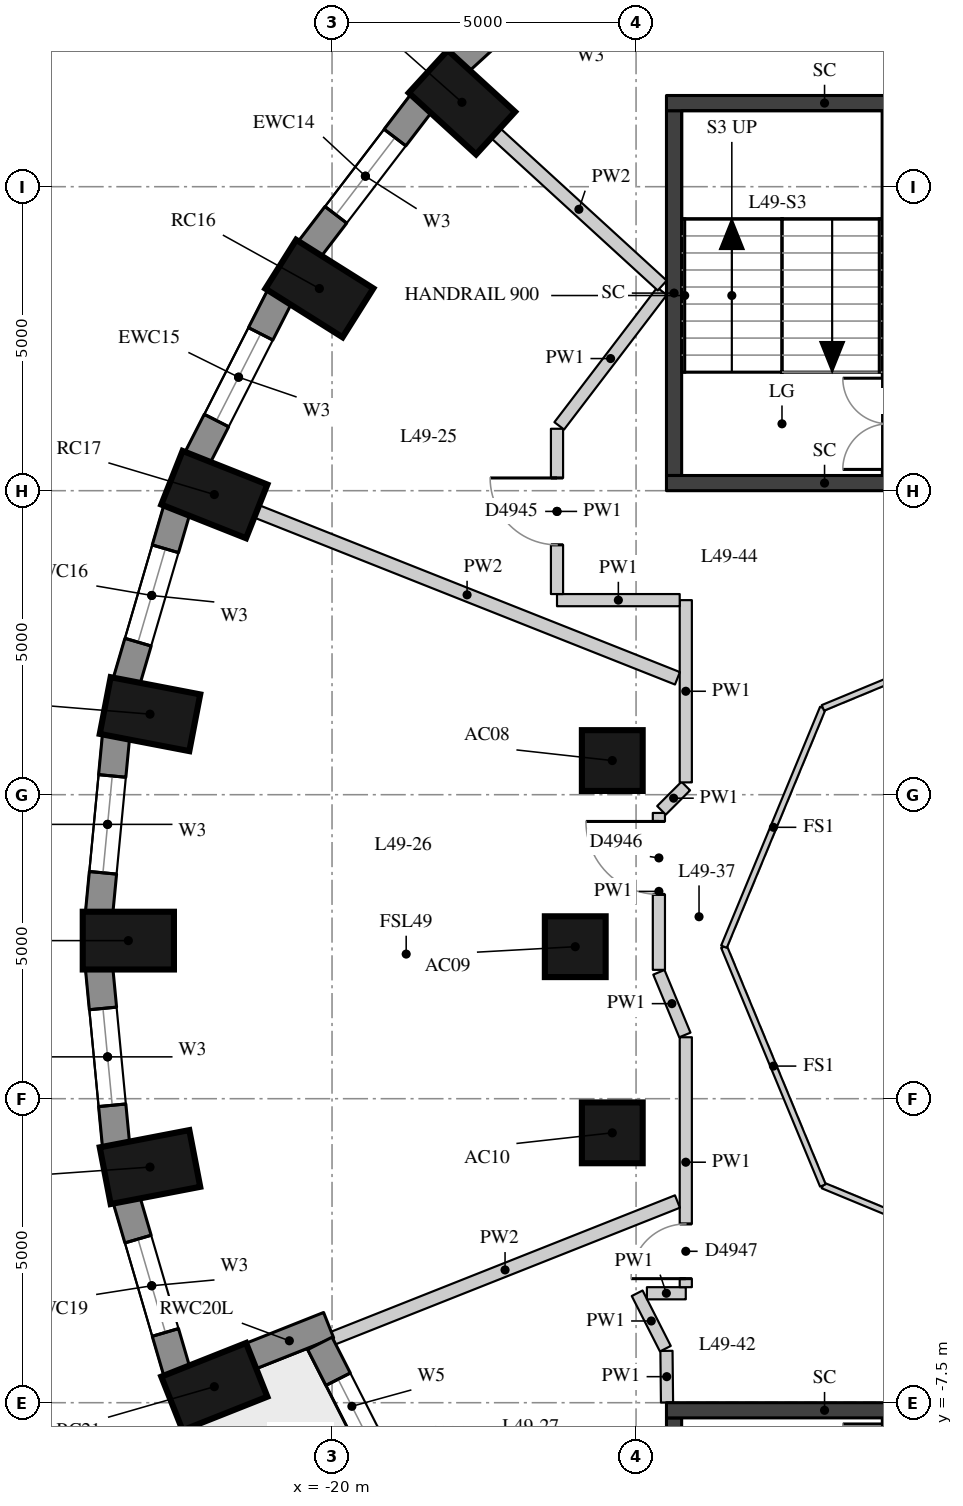
"""IFC4 building model, lengths in metres.
Left out: names, types, materials, properties, quantities, classifications, styles, units other than length and angle.
Written with IfcOpenShell. Run it as: python <this file> out.ifc"""

import sys

from ifc_helpers import new_model, si_unit, direction, frame, frame_2d, origin, origin_2d, place, context, subcontext, project, spatial, rectangle, extrude, element, fill, save


model = new_model("IFC4")
c1 = context("Model", 3, precision=1e-05, world=origin(), true_north=direction((0.0, 1.0)))
c2 = subcontext(c1, "Body", "Model", "MODEL_VIEW")
j1 = project(units=[si_unit("LENGTHUNIT", "METRE"), si_unit("PLANEANGLEUNIT", "RADIAN")], contexts=[c1])
p1 = place(None, origin())
s1 = spatial("IfcSite", under=j1, at=p1, CompositionType="ELEMENT")
p2 = place(p1, origin())
s2 = spatial("IfcBuilding", under=s1, at=p2, CompositionType="ELEMENT")
p3 = place(p2, frame((0.0, 0.0, 174.8)))
s3 = spatial("IfcBuildingStorey", under=s2, at=p3, CompositionType="ELEMENT", Elevation=174.8)
for number, where, z_axis, x_axis in (
    (1, (-17.864, 13.888, 0.0), (0.0, 0.0, 1.0), (-0.738, 0.675, 0.0)),
    (2, (-20.208, 10.825, 0.0), (0.0, 0.0, 1.0), (-0.846, 0.533, 0.0)),
    (3, (-21.936, 7.436, 0.0), (0.0, 0.0, 1.0), (-0.93, 0.369, 0.0)),
    (4, (-22.994, 3.825, 0.0), (0.0, 0.0, 1.0), (-0.982, 0.189, 0.0)),
    (5, (-23.35, 0.1, 0.0), (0.0, 0.0, 1.0), (-1.0, 0.0, 0.0)),
    (6, (-22.994, -3.625, 0.0), (0.0, 0.0, 1.0), (-0.982, -0.189, 0.0)),
    (7, (-21.936, -7.236, 0.0), (0.0, 0.0, 1.0), (-0.93, -0.369, 0.0)),
):
    element("IfcColumn", number, at=place(p3, frame(where, z_axis=z_axis, x_axis=x_axis)), inside=s3, PredefinedType="COLUMN", context=c2, shape_type="SweptSolid", body=[
        extrude(rectangle(XDim=1.5, YDim=0.95, at=origin_2d()), origin(), (0.0, 0.0, 1.0), 3.3),
    ])
for number, where, z_axis, x_axis in (
    (8, (-15.391, 3.062, 0.0), (0.0, 0.0, 1.0), (1.0, 0.0, 0.0)),
    (9, (-16.0, 0.0, 0.0), (0.0, 0.0, 1.0), (1.0, 0.0, 0.0)),
    (10, (-15.391, -3.062, 0.0), (0.0, 0.0, 1.0), (1.0, 0.0, 0.0)),
):
    element("IfcColumn", number, at=place(p3, frame(where, z_axis=z_axis, x_axis=x_axis)), inside=s3, PredefinedType="COLUMN", context=c2, shape_type="SweptSolid", body=[
        extrude(rectangle(XDim=1.0, YDim=1.0, at=origin_2d()), origin(), (0.0, 0.0, 1.0), 3.3),
    ])
p4 = place(p3, frame((-15.63, 16.639, 0.0), z_axis=(0.0, 0.0, 1.0), x_axis=(-0.737808755941, -0.675009807082, 0.0)))
e11 = element("IfcWall", 11, at=p4, inside=s3, PredefinedType="SOLIDWALL", context=c2, shape_type="SweptSolid", body=[
    extrude(rectangle(XDim=3.094, YDim=0.45, at=frame_2d((1.547, 0.0))), origin(), (0.0, 0.0, 1.0), 3.02),
])
p5 = place(p4, frame((0.747, 0.0, 0.4)))
e12 = element("IfcOpeningElement", 12, at=p5, cuts=e11, PredefinedType="OPENING", context=c2, shape_type="SweptSolid", body=[
    extrude(rectangle(XDim=1.6, YDim=1.75, at=frame_2d((0.8, 0.875))), frame((0.0, 0.235, 0.0), z_axis=(0.0, -1.0, 0.0), x_axis=(1.0, 0.0, 0.0)), (0.0, 0.0, 1.0), 0.47),
])
p6 = place(p3, frame((-18.528, 13.879, 0.0), z_axis=(0.0, 0.0, 1.0), x_axis=(-0.607817056371, -0.794077090706, 0.0)))
e13 = element("IfcWall", 13, at=p6, inside=s3, PredefinedType="SOLIDWALL", context=c2, shape_type="SweptSolid", body=[
    extrude(rectangle(XDim=3.037, YDim=0.45, at=frame_2d((1.519, 0.0))), origin(), (0.0, 0.0, 1.0), 3.02),
])
p7 = place(p6, frame((0.719, 0.0, 0.4)))
e14 = element("IfcOpeningElement", 14, at=p7, cuts=e13, PredefinedType="OPENING", context=c2, shape_type="SweptSolid", body=[
    extrude(rectangle(XDim=1.6, YDim=1.75, at=frame_2d((0.8, 0.875))), frame((0.0, 0.235, 0.0), z_axis=(0.0, -1.0, 0.0), x_axis=(1.0, 0.0, 0.0)), (0.0, 0.0, 1.0), 0.47),
])
p8 = place(p3, frame((-20.859, 10.697, 0.0), z_axis=(0.0, 0.0, 1.0), x_axis=(-0.454133999889, -0.890933392653, 0.0)))
e15 = element("IfcWall", 15, at=p8, inside=s3, PredefinedType="SOLIDWALL", context=c2, shape_type="SweptSolid", body=[
    extrude(rectangle(XDim=2.986, YDim=0.45, at=frame_2d((1.493, 0.0))), origin(), (0.0, 0.0, 1.0), 3.02),
])
p9 = place(p8, frame((0.693, 0.0, 0.4)))
e16 = element("IfcOpeningElement", 16, at=p9, cuts=e15, PredefinedType="OPENING", context=c2, shape_type="SweptSolid", body=[
    extrude(rectangle(XDim=1.6, YDim=1.75, at=frame_2d((0.8, 0.875))), frame((0.0, 0.235, 0.0), z_axis=(0.0, -1.0, 0.0), x_axis=(1.0, 0.0, 0.0)), (0.0, 0.0, 1.0), 0.47),
])
p10 = place(p3, frame((-22.551, 7.191, 0.0), z_axis=(0.0, 0.0, 1.0), x_axis=(-0.281125768296, -0.959670934435, 0.0)))
e17 = element("IfcWall", 17, at=p10, inside=s3, PredefinedType="SOLIDWALL", context=c2, shape_type="SweptSolid", body=[
    extrude(rectangle(XDim=2.948, YDim=0.45, at=frame_2d((1.474, 0.0))), origin(), (0.0, 0.0, 1.0), 3.02),
])
p11 = place(p10, frame((0.674, 0.0, 0.4)))
e18 = element("IfcOpeningElement", 18, at=p11, cuts=e17, PredefinedType="OPENING", context=c2, shape_type="SweptSolid", body=[
    extrude(rectangle(XDim=1.6, YDim=1.75, at=frame_2d((0.8, 0.875))), frame((0.0, 0.235, 0.0), z_axis=(0.0, -1.0, 0.0), x_axis=(1.0, 0.0, 0.0)), (0.0, 0.0, 1.0), 0.47),
])
p12 = place(p3, frame((-23.552, 3.469, 0.0), z_axis=(0.0, 0.0, 1.0), x_axis=(-0.095265737322, -0.995451876935, 0.0)))
e19 = element("IfcWall", 19, at=p12, inside=s3, PredefinedType="SOLIDWALL", context=c2, shape_type="SweptSolid", body=[
    extrude(rectangle(XDim=2.927, YDim=0.45, at=frame_2d((1.463, 0.0))), origin(), (0.0, 0.0, 1.0), 3.02),
])
p13 = place(p12, frame((0.663, 0.0, 0.4)))
e20 = element("IfcOpeningElement", 20, at=p13, cuts=e19, PredefinedType="OPENING", context=c2, shape_type="SweptSolid", body=[
    extrude(rectangle(XDim=1.6, YDim=1.75, at=frame_2d((0.8, 0.875))), frame((0.0, 0.235, 0.0), z_axis=(0.0, -1.0, 0.0), x_axis=(1.0, 0.0, 0.0)), (0.0, 0.0, 1.0), 0.47),
])
p14 = place(p3, frame((-23.831, -0.355, 0.0), z_axis=(0.0, 0.0, 1.0), x_axis=(0.095257827044, -0.995452633924, 0.0)))
e21 = element("IfcWall", 21, at=p14, inside=s3, PredefinedType="SOLIDWALL", context=c2, shape_type="SweptSolid", body=[
    extrude(rectangle(XDim=2.927, YDim=0.45, at=frame_2d((1.463, 0.0))), origin(), (0.0, 0.0, 1.0), 3.02),
])
p15 = place(p14, frame((0.663, 0.0, 0.4)))
e22 = element("IfcOpeningElement", 22, at=p15, cuts=e21, PredefinedType="OPENING", context=c2, shape_type="SweptSolid", body=[
    extrude(rectangle(XDim=1.6, YDim=1.75, at=frame_2d((0.8, 0.875))), frame((0.0, 0.235, 0.0), z_axis=(0.0, -1.0, 0.0), x_axis=(1.0, 0.0, 0.0)), (0.0, 0.0, 1.0), 0.47),
])
p16 = place(p3, frame((-23.38, -4.162, 0.0), z_axis=(0.0, 0.0, 1.0), x_axis=(0.281125768296, -0.959670934435, 0.0)))
e23 = element("IfcWall", 23, at=p16, inside=s3, PredefinedType="SOLIDWALL", context=c2, shape_type="SweptSolid", body=[
    extrude(rectangle(XDim=2.948, YDim=0.45, at=frame_2d((1.474, 0.0))), origin(), (0.0, 0.0, 1.0), 3.02),
])
p17 = place(p16, frame((0.674, 0.0, 0.4)))
e24 = element("IfcOpeningElement", 24, at=p17, cuts=e23, PredefinedType="OPENING", context=c2, shape_type="SweptSolid", body=[
    extrude(rectangle(XDim=1.6, YDim=1.75, at=frame_2d((0.8, 0.875))), frame((0.0, 0.235, 0.0), z_axis=(0.0, -1.0, 0.0), x_axis=(1.0, 0.0, 0.0)), (0.0, 0.0, 1.0), 0.47),
])
p18 = place(p3, frame((-21.348, -6.738, 0.0), z_axis=(0.0, 0.0, 1.0), x_axis=(0.929514600716, 0.368785312961, 0.0)))
e25 = element("IfcWall", 25, at=p18, inside=s3, PredefinedType="SOLIDWALL", context=c2, shape_type="SweptSolid", body=[
    extrude(rectangle(XDim=1.39, YDim=0.45, at=frame_2d((0.695, 0.0))), origin(), (0.0, 0.0, 1.0), 3.02),
])
p19 = place(p3, frame((-20.2, -6.524, 0.0), z_axis=(0.0, 0.0, 1.0), x_axis=(0.453222057065, -0.891397648073, 0.0)))
e26 = element("IfcWall", 26, at=p19, inside=s3, PredefinedType="SOLIDWALL", context=c2, shape_type="SweptSolid", body=[
    extrude(rectangle(XDim=3.472, YDim=0.45, at=frame_2d((1.736, 0.0))), origin(), (0.0, 0.0, 1.0), 3.02),
])
p20 = place(p19, frame((0.661, 0.0, 0.4)))
e27 = element("IfcOpeningElement", 27, at=p20, cuts=e26, PredefinedType="OPENING", context=c2, shape_type="SweptSolid", body=[
    extrude(rectangle(XDim=1.0, YDim=1.75, at=frame_2d((0.5, 0.875))), frame((0.0, 0.235, 0.0), z_axis=(0.0, -1.0, 0.0), x_axis=(1.0, 0.0, 0.0)), (0.0, 0.0, 1.0), 0.47),
])
p21 = place(p19, frame((1.811, 0.0, 0.0)))
e28 = element("IfcOpeningElement", 28, at=p21, cuts=e26, PredefinedType="OPENING", context=c2, shape_type="SweptSolid", body=[
    extrude(rectangle(XDim=1.0, YDim=2.15, at=frame_2d((0.5, 1.075))), frame((0.0, 0.235, 0.0), z_axis=(0.0, -1.0, 0.0), x_axis=(1.0, 0.0, 0.0)), (0.0, 0.0, 1.0), 0.47),
])
p22 = place(p3, frame((-10.85, 7.75, 0.0), z_axis=(0.0, 0.0, 1.0), x_axis=(0.0, 1.0, 0.0)))
e29 = element("IfcWall", 29, at=p22, inside=s3, PredefinedType="SHEAR", context=c2, shape_type="SweptSolid", body=[
    extrude(rectangle(XDim=6.0, YDim=0.2, at=frame_2d((3.0, 0.0))), origin(), (0.0, 0.0, 1.0), 3.02),
])
p23 = place(p22, frame((0.1, 0.0, 0.0)))
e30 = element("IfcOpeningElement", 30, at=p23, cuts=e29, PredefinedType="OPENING", context=c2, shape_type="SweptSolid", body=[
    extrude(rectangle(XDim=1.5, YDim=2.1, at=frame_2d((0.75, 1.05))), frame((0.0, 0.11, 0.0), z_axis=(0.0, -1.0, 0.0), x_axis=(1.0, 0.0, 0.0)), (0.0, 0.0, 1.0), 0.22),
])
p24 = place(p3, frame((-10.85, -13.75, 0.0), z_axis=(0.0, 0.0, 1.0), x_axis=(0.0, 1.0, 0.0)))
e31 = element("IfcWall", 31, at=p24, inside=s3, PredefinedType="SHEAR", context=c2, shape_type="SweptSolid", body=[
    extrude(rectangle(XDim=6.0, YDim=0.2, at=frame_2d((3.0, 0.0))), origin(), (0.0, 0.0, 1.0), 3.02),
])
p25 = place(p24, frame((4.4, 0.0, 0.0)))
e32 = element("IfcOpeningElement", 32, at=p25, cuts=e31, PredefinedType="OPENING", context=c2, shape_type="SweptSolid", body=[
    extrude(rectangle(XDim=1.5, YDim=2.1, at=frame_2d((0.75, 1.05))), frame((0.0, 0.11, 0.0), z_axis=(0.0, -1.0, 0.0), x_axis=(1.0, 0.0, 0.0)), (0.0, 0.0, 1.0), 0.22),
])
p26 = place(p3, frame((-14.375, 7.75, -0.28), z_axis=(0.0, 0.0, 1.0), x_axis=(0.0, 1.0, 0.0)))
e33 = element("IfcWall", 33, at=p26, inside=s3, PredefinedType="SHEAR", context=c2, shape_type="SweptSolid", body=[
    extrude(rectangle(XDim=6.0, YDim=0.25, at=frame_2d((3.0, 0.0))), origin(), (0.0, 0.0, 1.0), 3.3),
])
for number, where, z_axis, x_axis in (
    (34, (-14.5, 13.875, -0.28), (0.0, 0.0, 1.0), (1.0, 0.0, 0.0)),
    (35, (-14.5, 7.625, -0.28), (0.0, 0.0, 1.0), (1.0, 0.0, 0.0)),
):
    element("IfcWall", number, at=place(p3, frame(where, z_axis=z_axis, x_axis=x_axis)), inside=s3, PredefinedType="SHEAR", context=c2, shape_type="SweptSolid", body=[
        extrude(rectangle(XDim=5.2, YDim=0.25, at=frame_2d((2.6, 0.0))), origin(), (0.0, 0.0, 1.0), 3.3),
    ])
p27 = place(p3, frame((-14.375, -13.75, -0.28), z_axis=(0.0, 0.0, 1.0), x_axis=(0.0, 1.0, 0.0)))
e36 = element("IfcWall", 36, at=p27, inside=s3, PredefinedType="SHEAR", context=c2, shape_type="SweptSolid", body=[
    extrude(rectangle(XDim=6.0, YDim=0.25, at=frame_2d((3.0, 0.0))), origin(), (0.0, 0.0, 1.0), 3.3),
])
p28 = place(p3, frame((-14.5, -7.625, -0.28), z_axis=(0.0, 0.0, 1.0), x_axis=(1.0, 0.0, 0.0)))
e37 = element("IfcWall", 37, at=p28, inside=s3, PredefinedType="SHEAR", context=c2, shape_type="SweptSolid", body=[
    extrude(rectangle(XDim=5.2, YDim=0.25, at=frame_2d((2.6, 0.0))), origin(), (0.0, 0.0, 1.0), 3.3),
])
p29 = place(p3, frame((-14.491, -7.496, 0.0), z_axis=(0.0, 0.0, 1.0), x_axis=(-0.010931452674, 0.999940249886, 0.0)))
e38 = element("IfcWall", 38, at=p29, inside=s3, PredefinedType="PARTITIONING", context=c2, shape_type="SweptSolid", body=[
    extrude(rectangle(XDim=0.849, YDim=0.2, at=frame_2d((0.424, 0.0))), origin(), (0.0, 0.0, 1.0), 3.02),
])
p30 = place(p3, frame((-14.518, -6.612, 0.0), z_axis=(0.0, 0.0, 1.0), x_axis=(-0.45321774915, 0.891399838375, 0.0)))
e39 = element("IfcWall", 39, at=p30, inside=s3, PredefinedType="PARTITIONING", context=c2, shape_type="SweptSolid", body=[
    extrude(rectangle(XDim=1.023, YDim=0.2, at=frame_2d((0.511, 0.0))), origin(), (0.0, 0.0, 1.0), 3.02),
])
p31 = place(p3, frame((-14.822, -5.7, 0.0), z_axis=(0.0, 0.0, 1.0), x_axis=(1.0, 0.0, 0.0)))
e40 = element("IfcWall", 40, at=p31, inside=s3, PredefinedType="PARTITIONING", context=c2, shape_type="SweptSolid", body=[
    extrude(rectangle(XDim=0.639, YDim=0.2, at=frame_2d((0.32, 0.0))), origin(), (0.0, 0.0, 1.0), 3.02),
])
p32 = place(p3, frame((-14.182, -5.6, 0.0), z_axis=(0.0, 0.0, 1.0), x_axis=(0.0, 1.0, 0.0)))
e41 = element("IfcWall", 41, at=p32, inside=s3, PredefinedType="PARTITIONING", context=c2, shape_type="SweptSolid", body=[
    extrude(rectangle(XDim=4.111, YDim=0.2, at=frame_2d((2.055, 0.0))), origin(), (0.0, 0.0, 1.0), 3.02),
])
p33 = place(p32, frame((0.14, 0.0, 0.0)))
e42 = element("IfcOpeningElement", 42, at=p33, cuts=e41, PredefinedType="OPENING", context=c2, shape_type="SweptSolid", body=[
    extrude(rectangle(XDim=0.9, YDim=2.1, at=frame_2d((0.45, 1.05))), frame((0.0, 0.11, 0.0), z_axis=(0.0, -1.0, 0.0), x_axis=(1.0, 0.0, 0.0)), (0.0, 0.0, 1.0), 0.22),
])
p34 = place(p3, frame((-14.197, -1.452, 0.0), z_axis=(0.0, 0.0, 1.0), x_axis=(-0.382750994913, 0.923851544293, 0.0)))
e43 = element("IfcWall", 43, at=p34, inside=s3, PredefinedType="PARTITIONING", context=c2, shape_type="SweptSolid", body=[
    extrude(rectangle(XDim=1.116, YDim=0.2, at=frame_2d((0.558, 0.0))), origin(), (0.0, 0.0, 1.0), 3.02),
])
p35 = place(p3, frame((-14.625, -0.381, 0.0), z_axis=(0.0, 0.0, 1.0), x_axis=(0.0, 1.0, 0.0)))
e44 = element("IfcWall", 44, at=p35, inside=s3, PredefinedType="PARTITIONING", context=c2, shape_type="SweptSolid", body=[
    extrude(rectangle(XDim=2.581, YDim=0.2, at=frame_2d((1.291, 0.0))), origin(), (0.0, 0.0, 1.0), 3.02),
])
p36 = place(p35, frame((1.241, 0.0, 0.0)))
e45 = element("IfcOpeningElement", 45, at=p36, cuts=e44, PredefinedType="OPENING", context=c2, shape_type="SweptSolid", body=[
    extrude(rectangle(XDim=1.2, YDim=2.1, at=frame_2d((0.6, 1.05))), frame((0.0, 0.11, 0.0), z_axis=(0.0, -1.0, 0.0), x_axis=(1.0, 0.0, 0.0)), (0.0, 0.0, 1.0), 0.22),
])
p37 = place(p3, frame((-14.582, 2.242, 0.0), z_axis=(0.0, 0.0, 1.0), x_axis=(0.706890969579, 0.707322526948, 0.0)))
e46 = element("IfcWall", 46, at=p37, inside=s3, PredefinedType="PARTITIONING", context=c2, shape_type="SweptSolid", body=[
    extrude(rectangle(XDim=0.566, YDim=0.2, at=frame_2d((0.283, 0.0))), origin(), (0.0, 0.0, 1.0), 3.02),
])
p38 = place(p3, frame((-14.182, 2.703, 0.0), z_axis=(0.0, 0.0, 1.0), x_axis=(0.0, 1.0, 0.0)))
e47 = element("IfcWall", 47, at=p38, inside=s3, PredefinedType="PARTITIONING", context=c2, shape_type="SweptSolid", body=[
    extrude(rectangle(XDim=2.997, YDim=0.2, at=frame_2d((1.499, 0.0))), origin(), (0.0, 0.0, 1.0), 3.02),
])
p39 = place(p3, frame((-14.282, 5.7, 0.0), z_axis=(0.0, 0.0, 1.0), x_axis=(-1.0, 0.0, 0.0)))
e48 = element("IfcWall", 48, at=p39, inside=s3, PredefinedType="PARTITIONING", context=c2, shape_type="SweptSolid", body=[
    extrude(rectangle(XDim=2.018, YDim=0.2, at=frame_2d((1.009, 0.0))), origin(), (0.0, 0.0, 1.0), 3.02),
])
p40 = place(p3, frame((-16.3, 5.8, 0.0), z_axis=(0.0, 0.0, 1.0), x_axis=(0.0, 1.0, 0.0)))
e49 = element("IfcWall", 49, at=p40, inside=s3, PredefinedType="PARTITIONING", context=c2, shape_type="SweptSolid", body=[
    extrude(rectangle(XDim=2.719, YDim=0.2, at=frame_2d((1.359, 0.0))), origin(), (0.0, 0.0, 1.0), 3.02),
])
p41 = place(p40, frame((0.809, 0.0, 0.0)))
e50 = element("IfcOpeningElement", 50, at=p41, cuts=e49, PredefinedType="OPENING", context=c2, shape_type="SweptSolid", body=[
    extrude(rectangle(XDim=1.1, YDim=2.1, at=frame_2d((0.55, 1.05))), frame((0.0, 0.11, 0.0), z_axis=(0.0, -1.0, 0.0), x_axis=(1.0, 0.0, 0.0)), (0.0, 0.0, 1.0), 0.22),
])
p42 = place(p3, frame((-16.263, 8.566, 0.0), z_axis=(0.0, 0.0, 1.0), x_axis=(0.606668946119, 0.794954583492, 0.0)))
e51 = element("IfcWall", 51, at=p42, inside=s3, PredefinedType="PARTITIONING", context=c2, shape_type="SweptSolid", body=[
    extrude(rectangle(XDim=2.785, YDim=0.2, at=frame_2d((1.393, 0.0))), origin(), (0.0, 0.0, 1.0), 3.02),
])
p43 = place(p3, frame((-17.31, 13.382, 0.0), z_axis=(0.0, 0.0, 1.0), x_axis=(0.737827699829, -0.674989100182, 0.0)))
e52 = element("IfcWall", 52, at=p43, inside=s3, PredefinedType="PARTITIONING", context=c2, shape_type="SweptSolid", body=[
    extrude(rectangle(XDim=3.714, YDim=0.22, at=frame_2d((1.857, 0.0))), origin(), (0.0, 0.0, 1.0), 3.02),
])
p44 = place(p3, frame((-21.239, 7.16, 0.0), z_axis=(0.0, 0.0, 1.0), x_axis=(0.929511234156, -0.368793798182, 0.0)))
e53 = element("IfcWall", 53, at=p44, inside=s3, PredefinedType="PARTITIONING", context=c2, shape_type="SweptSolid", body=[
    extrude(rectangle(XDim=7.444, YDim=0.22, at=frame_2d((3.722, 0.0))), origin(), (0.0, 0.0, 1.0), 3.02),
])
p45 = place(p3, frame((-19.99, -6.441, 0.0), z_axis=(0.0, 0.0, 1.0), x_axis=(0.929499857769, 0.368822470042, 0.0)))
e54 = element("IfcWall", 54, at=p45, inside=s3, PredefinedType="PARTITIONING", context=c2, shape_type="SweptSolid", body=[
    extrude(rectangle(XDim=6.101, YDim=0.22, at=frame_2d((3.05, 0.0))), origin(), (0.0, 0.0, 1.0), 3.02),
])
for number, where, z_axis, x_axis in (
    (55, (-8.0, -5.554, 0.0), (0.0, 0.0, 1.0), (-0.924, 0.383, 0.0)),
    (56, (-11.927, -3.927, 0.0), (0.0, 0.0, 1.0), (-0.383, 0.924, 0.0)),
    (57, (-13.554, 0.0, 0.0), (0.0, 0.0, 1.0), (0.383, 0.924, 0.0)),
    (58, (-11.927, 3.927, 0.0), (0.0, 0.0, 1.0), (0.924, 0.383, 0.0)),
):
    element("IfcWall", number, at=place(p3, frame(where, z_axis=z_axis, x_axis=x_axis)), inside=s3, PredefinedType="PARTITIONING", context=c2, shape_type="SweptSolid", body=[
        extrude(rectangle(XDim=4.251, YDim=0.1, at=frame_2d((2.125, 0.0))), origin(), (0.0, 0.0, 1.0), 3.02),
    ])
p46 = place(p7, origin())
e59 = element("IfcWindow", 59, at=p46, inside=s3, PartitioningType="SINGLE_PANEL", PredefinedType="WINDOW", context=c2, shape_type="SweptSolid", body=[
    extrude(rectangle(XDim=1.6, YDim=1.75, at=frame_2d((0.8, 0.875))), frame((0.0, 0.035, 0.0), z_axis=(0.0, -1.0, 0.0), x_axis=(1.0, 0.0, 0.0)), (0.0, 0.0, 1.0), 0.06),
])
fill(e14, e59)
p47 = place(p9, origin())
e60 = element("IfcWindow", 60, at=p47, inside=s3, PartitioningType="SINGLE_PANEL", PredefinedType="WINDOW", context=c2, shape_type="SweptSolid", body=[
    extrude(rectangle(XDim=1.6, YDim=1.75, at=frame_2d((0.8, 0.875))), frame((0.0, 0.035, 0.0), z_axis=(0.0, -1.0, 0.0), x_axis=(1.0, 0.0, 0.0)), (0.0, 0.0, 1.0), 0.06),
])
fill(e16, e60)
p48 = place(p11, origin())
e61 = element("IfcWindow", 61, at=p48, inside=s3, PartitioningType="SINGLE_PANEL", PredefinedType="WINDOW", context=c2, shape_type="SweptSolid", body=[
    extrude(rectangle(XDim=1.6, YDim=1.75, at=frame_2d((0.8, 0.875))), frame((0.0, 0.035, 0.0), z_axis=(0.0, -1.0, 0.0), x_axis=(1.0, 0.0, 0.0)), (0.0, 0.0, 1.0), 0.06),
])
fill(e18, e61)
p49 = place(p13, origin())
e62 = element("IfcWindow", 62, at=p49, inside=s3, PartitioningType="SINGLE_PANEL", PredefinedType="WINDOW", context=c2, shape_type="SweptSolid", body=[
    extrude(rectangle(XDim=1.6, YDim=1.75, at=frame_2d((0.8, 0.875))), frame((0.0, 0.035, 0.0), z_axis=(0.0, -1.0, 0.0), x_axis=(1.0, 0.0, 0.0)), (0.0, 0.0, 1.0), 0.06),
])
fill(e20, e62)
p50 = place(p15, origin())
e63 = element("IfcWindow", 63, at=p50, inside=s3, PartitioningType="SINGLE_PANEL", PredefinedType="WINDOW", context=c2, shape_type="SweptSolid", body=[
    extrude(rectangle(XDim=1.6, YDim=1.75, at=frame_2d((0.8, 0.875))), frame((0.0, 0.035, 0.0), z_axis=(0.0, -1.0, 0.0), x_axis=(1.0, 0.0, 0.0)), (0.0, 0.0, 1.0), 0.06),
])
fill(e22, e63)
p51 = place(p17, origin())
e64 = element("IfcWindow", 64, at=p51, inside=s3, PartitioningType="SINGLE_PANEL", PredefinedType="WINDOW", context=c2, shape_type="SweptSolid", body=[
    extrude(rectangle(XDim=1.6, YDim=1.75, at=frame_2d((0.8, 0.875))), frame((0.0, 0.035, 0.0), z_axis=(0.0, -1.0, 0.0), x_axis=(1.0, 0.0, 0.0)), (0.0, 0.0, 1.0), 0.06),
])
fill(e24, e64)
p52 = place(p20, origin())
e65 = element("IfcWindow", 65, at=p52, inside=s3, PartitioningType="SINGLE_PANEL", PredefinedType="WINDOW", context=c2, shape_type="SweptSolid", body=[
    extrude(rectangle(XDim=1.0, YDim=1.75, at=frame_2d((0.5, 0.875))), frame((0.0, 0.035, 0.0), z_axis=(0.0, -1.0, 0.0), x_axis=(1.0, 0.0, 0.0)), (0.0, 0.0, 1.0), 0.06),
])
fill(e27, e65)
p53 = place(p41, origin())
e66 = element("IfcDoor", 66, at=p53, inside=s3, OperationType="SINGLE_SWING_RIGHT", PredefinedType="DOOR", context=c2, shape_type="SweptSolid", body=[
    extrude(rectangle(XDim=1.1, YDim=2.1, at=frame_2d((0.55, 1.05))), frame((0.0, 0.025, 0.0), z_axis=(0.0, -1.0, 0.0), x_axis=(1.0, 0.0, 0.0)), (0.0, 0.0, 1.0), 0.05),
])
fill(e50, e66)
p54 = place(p36, origin())
e67 = element("IfcDoor", 67, at=p54, inside=s3, OperationType="SINGLE_SWING_RIGHT", PredefinedType="DOOR", context=c2, shape_type="SweptSolid", body=[
    extrude(rectangle(XDim=1.2, YDim=2.1, at=frame_2d((0.6, 1.05))), frame((0.0, 0.025, 0.0), z_axis=(0.0, -1.0, 0.0), x_axis=(1.0, 0.0, 0.0)), (0.0, 0.0, 1.0), 0.05),
])
fill(e45, e67)
p55 = place(p33, origin())
e68 = element("IfcDoor", 68, at=p55, inside=s3, OperationType="SINGLE_SWING_LEFT", PredefinedType="DOOR", context=c2, shape_type="SweptSolid", body=[
    extrude(rectangle(XDim=0.9, YDim=2.1, at=frame_2d((0.45, 1.05))), frame((0.0, 0.025, 0.0), z_axis=(0.0, -1.0, 0.0), x_axis=(1.0, 0.0, 0.0)), (0.0, 0.0, 1.0), 0.05),
])
fill(e42, e68)
save(model, sys.argv[1])
